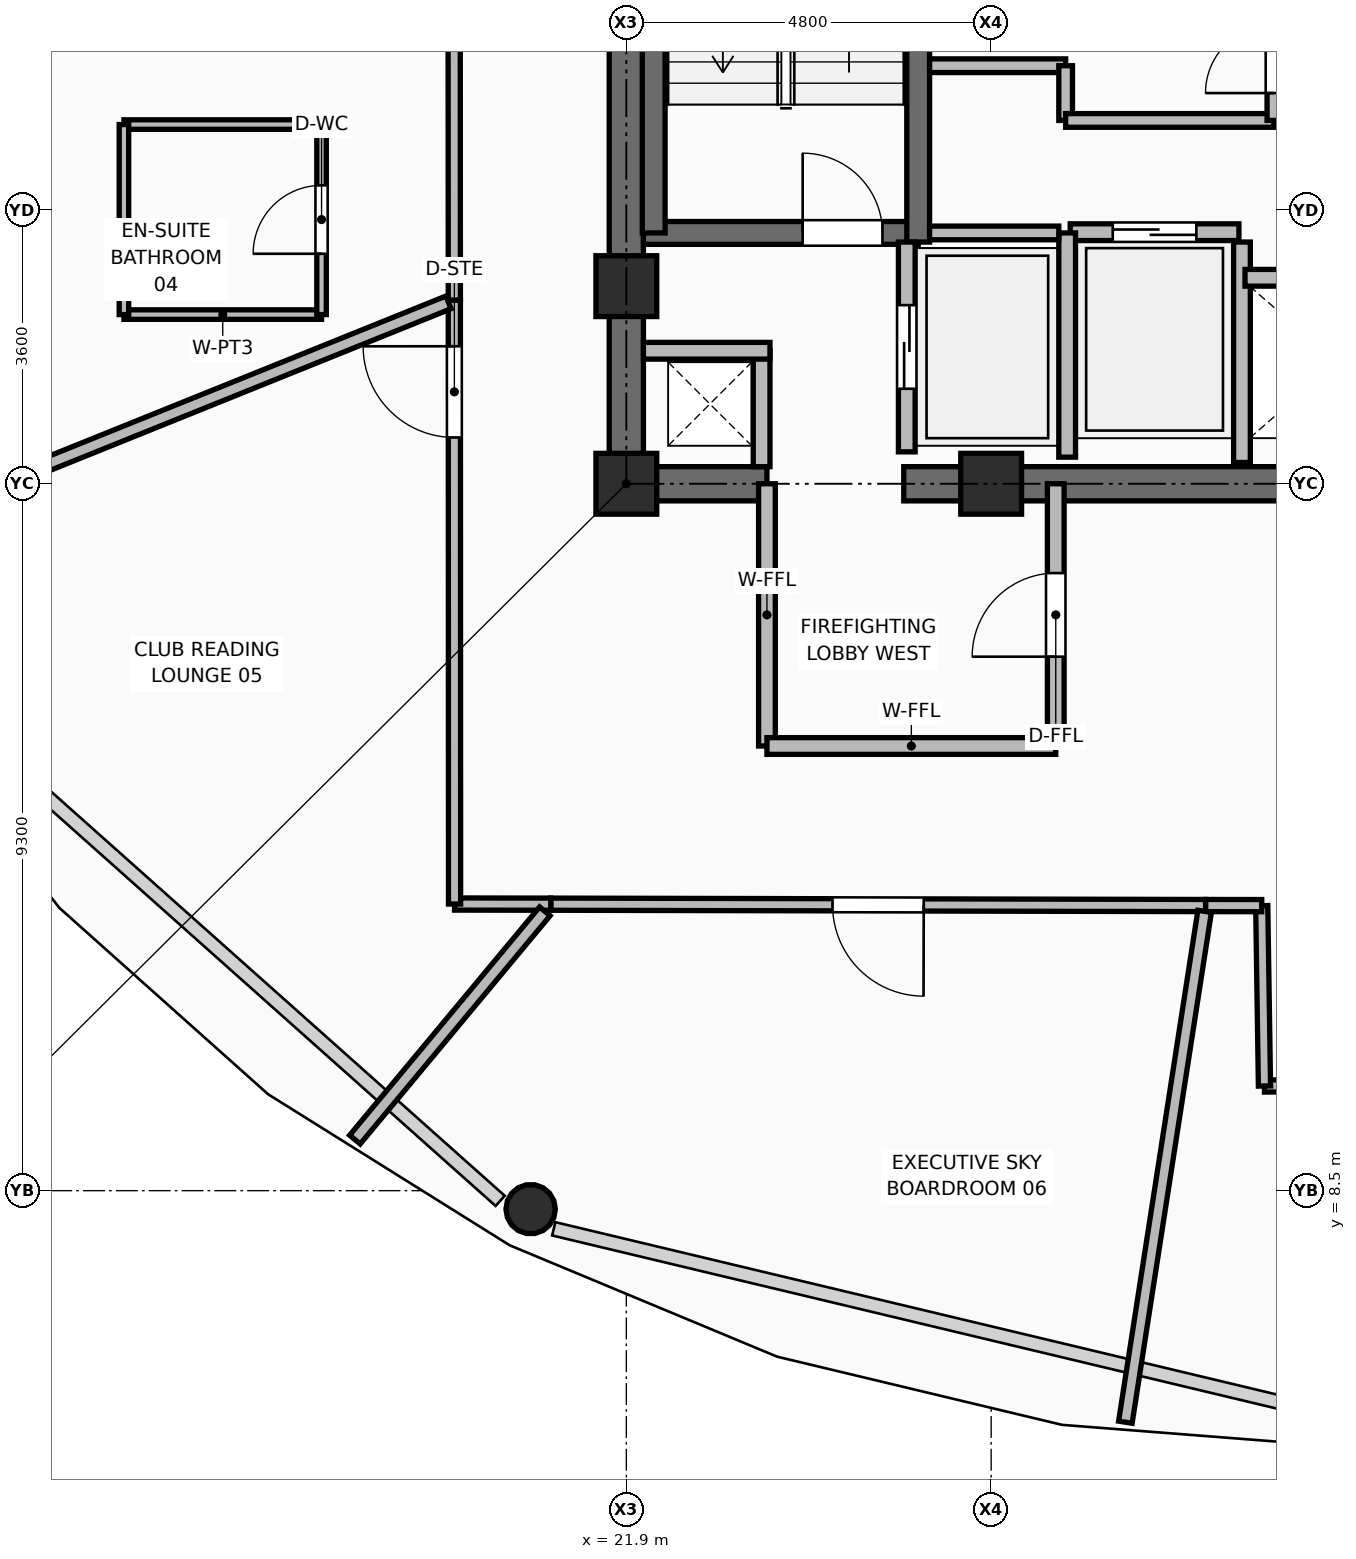
"""IFC4 building model, lengths in metres.
Left out: names, types, materials, properties, quantities, classifications, styles, units other than length and angle.
Written with IfcOpenShell. Run it as: python <this file> out.ifc"""

import sys

from ifc_helpers import new_model, si_unit, direction, frame, frame_2d, origin, origin_2d, place, context, subcontext, project, spatial, rectangle, hollow_circle, extrude, element, fill, save


model = new_model("IFC4")
c1 = context("Model", 3, precision=1e-05, world=origin(), true_north=direction((0.0, 1.0)))
c2 = subcontext(c1, "Body", "Model", "MODEL_VIEW")
j1 = project(units=[si_unit("LENGTHUNIT", "METRE"), si_unit("PLANEANGLEUNIT", "RADIAN")], contexts=[c1])
p1 = place(None, origin())
s1 = spatial("IfcSite", under=j1, at=p1, CompositionType="ELEMENT")
p2 = place(p1, origin())
s2 = spatial("IfcBuilding", under=s1, at=p2, CompositionType="ELEMENT")
p3 = place(p2, frame((0.0, 0.0, 246.15)))
s3 = spatial("IfcBuildingStorey", under=s2, at=p3, CompositionType="ELEMENT", Elevation=246.15)
for number, where, z_axis, x_axis in (
    (1, (21.9, 17.8, 0.0), (0.0, 0.0, 1.0), (1.0, 0.0, 0.0)),
    (2, (26.7, 17.8, 0.0), (0.0, 0.0, 1.0), (1.0, 0.0, 0.0)),
    (3, (21.9, 20.4, 0.0), (0.0, 0.0, 1.0), (1.0, 0.0, 0.0)),
):
    element("IfcColumn", number, at=place(p3, frame(where, z_axis=z_axis, x_axis=x_axis)), inside=s3, PredefinedType="COLUMN", context=c2, shape_type="SweptSolid", body=[
        extrude(rectangle(XDim=0.8, YDim=0.8, at=origin_2d()), origin(), (0.0, 0.0, 1.0), 3.75),
    ])
p4 = place(p3, frame((20.641, 8.257, 0.0), z_axis=(0.0, 0.0, 1.0), x_axis=(1.0, 0.0, 0.0)))
e4 = element("IfcColumn", 4, at=p4, inside=s3, PredefinedType="COLUMN", context=c2, shape_type="SweptSolid", body=[
    extrude(hollow_circle(Radius=0.325, WallThickness=0.03, at=origin_2d()), origin(), (0.0, 0.0, 1.0), 3.57),
])
p5 = place(p3, frame((30.0, 18.08, 0.0), z_axis=(0.0, 0.0, 1.0), x_axis=(0.0, 1.0, 0.0)))
e5 = element("IfcWall", 5, at=p5, inside=s3, PredefinedType="PARTITIONING", context=c2, shape_type="SweptSolid", body=[
    extrude(rectangle(XDim=2.9, YDim=0.22, at=frame_2d((1.45, 0.0))), origin(), (0.0, 0.0, 1.0), 3.545),
])
p6 = place(p3, frame((21.675, 17.8, 0.0), z_axis=(0.0, 0.0, 1.0), x_axis=(1.0, 0.0, 0.0)))
e6 = element("IfcWall", 6, at=p6, inside=s3, PredefinedType="SHEAR", context=c2, shape_type="SweptSolid", body=[
    extrude(rectangle(XDim=2.075, YDim=0.45, at=frame_2d((1.038, 0.0))), origin(), (0.0, 0.0, 1.0), 3.57),
])
p7 = place(p3, frame((25.55, 17.8, 0.0), z_axis=(0.0, 0.0, 1.0), x_axis=(1.0, 0.0, 0.0)))
e7 = element("IfcWall", 7, at=p7, inside=s3, PredefinedType="SHEAR", context=c2, shape_type="SweptSolid", body=[
    extrude(rectangle(XDim=6.9, YDim=0.45, at=frame_2d((3.45, 0.0))), origin(), (0.0, 0.0, 1.0), 3.57),
])
p8 = place(p3, frame((21.9, 18.025, 0.0), z_axis=(0.0, 0.0, 1.0), x_axis=(0.0, 1.0, 0.0)))
e8 = element("IfcWall", 8, at=p8, inside=s3, PredefinedType="SHEAR", context=c2, shape_type="SweptSolid", body=[
    extrude(rectangle(XDim=14.2, YDim=0.45, at=frame_2d((7.1, 0.0))), origin(), (0.0, 0.0, 1.0), 3.57),
])
p9 = place(p3, frame((22.125, 21.1, 0.0), z_axis=(0.0, 0.0, 1.0), x_axis=(1.0, 0.0, 0.0)))
e9 = element("IfcWall", 9, at=p9, inside=s3, PredefinedType="SHEAR", context=c2, shape_type="SweptSolid", body=[
    extrude(rectangle(XDim=3.615, YDim=0.3, at=frame_2d((1.808, 0.0))), origin(), (0.0, 0.0, 1.0), 3.57),
])
p10 = place(p9, frame((2.095, 0.0, 0.0)))
e10 = element("IfcOpeningElement", 10, at=p10, cuts=e9, PredefinedType="OPENING", context=c2, shape_type="SweptSolid", body=[
    extrude(rectangle(XDim=1.05, YDim=2.1, at=frame_2d((0.525, 1.05))), frame((0.0, 0.16, 0.0), z_axis=(0.0, -1.0, 0.0), x_axis=(1.0, 0.0, 0.0)), (0.0, 0.0, 1.0), 0.32),
])
p11 = place(p3, frame((25.74, 20.98, 0.0), z_axis=(0.0, 0.0, 1.0), x_axis=(0.0, 1.0, 0.0)))
e11 = element("IfcWall", 11, at=p11, inside=s3, PredefinedType="SHEAR", context=c2, shape_type="SweptSolid", body=[
    extrude(rectangle(XDim=7.99, YDim=0.3, at=frame_2d((3.995, 0.0))), origin(), (0.0, 0.0, 1.0), 3.57),
])
p12 = place(p3, frame((22.26, 21.1, 0.0), z_axis=(0.0, 0.0, 1.0), x_axis=(0.0, 1.0, 0.0)))
e12 = element("IfcWall", 12, at=p12, inside=s3, PredefinedType="SHEAR", context=c2, shape_type="SweptSolid", body=[
    extrude(rectangle(XDim=7.75, YDim=0.3, at=frame_2d((3.875, 0.0))), origin(), (0.0, 0.0, 1.0), 3.57),
])
p13 = place(p3, frame((23.68, 18.025, 0.0), z_axis=(0.0, 0.0, 1.0), x_axis=(0.0, 1.0, 0.0)))
e13 = element("IfcWall", 13, at=p13, inside=s3, PredefinedType="PARTITIONING", context=c2, shape_type="SweptSolid", body=[
    extrude(rectangle(XDim=1.525, YDim=0.22, at=frame_2d((0.763, 0.0))), origin(), (0.0, 0.0, 1.0), 3.55),
])
p14 = place(p3, frame((22.125, 19.55, 0.0), z_axis=(0.0, 0.0, 1.0), x_axis=(1.0, 0.0, 0.0)))
e14 = element("IfcWall", 14, at=p14, inside=s3, PredefinedType="PARTITIONING", context=c2, shape_type="SweptSolid", body=[
    extrude(rectangle(XDim=1.665, YDim=0.22, at=frame_2d((0.833, 0.0))), origin(), (0.0, 0.0, 1.0), 2.595),
])
p15 = place(p3, frame((25.59, 18.22, 0.0), z_axis=(0.0, 0.0, 1.0), x_axis=(0.0, 1.0, 0.0)))
e15 = element("IfcWall", 15, at=p15, inside=s3, PredefinedType="PARTITIONING", context=c2, shape_type="SweptSolid", body=[
    extrude(rectangle(XDim=2.76, YDim=0.22, at=frame_2d((1.38, 0.0))), origin(), (0.0, 0.0, 1.0), 3.55),
])
p16 = place(p15, frame((0.83, 0.0, 0.0)))
e16 = element("IfcOpeningElement", 16, at=p16, cuts=e15, PredefinedType="OPENING", context=c2, shape_type="SweptSolid", body=[
    extrude(rectangle(XDim=1.1, YDim=2.2, at=frame_2d((0.55, 1.1))), frame((0.0, 0.12, 0.0), z_axis=(0.0, -1.0, 0.0), x_axis=(1.0, 0.0, 0.0)), (0.0, 0.0, 1.0), 0.24),
])
p17 = place(p3, frame((27.74, 21.11, 0.0), z_axis=(0.0, 0.0, 1.0), x_axis=(1.0, 0.0, 0.0)))
e17 = element("IfcWall", 17, at=p17, inside=s3, PredefinedType="PARTITIONING", context=c2, shape_type="SweptSolid", body=[
    extrude(rectangle(XDim=2.22, YDim=0.22, at=frame_2d((1.11, 0.0))), origin(), (0.0, 0.0, 1.0), 3.55),
])
p18 = place(p17, frame((0.56, 0.0, 0.0)))
e18 = element("IfcOpeningElement", 18, at=p18, cuts=e17, PredefinedType="OPENING", context=c2, shape_type="SweptSolid", body=[
    extrude(rectangle(XDim=1.1, YDim=2.2, at=frame_2d((0.55, 1.1))), frame((0.0, 0.12, 0.0), z_axis=(0.0, -1.0, 0.0), x_axis=(1.0, 0.0, 0.0)), (0.0, 0.0, 1.0), 0.24),
])
p19 = place(p3, frame((30.04, 20.51, 0.0), z_axis=(0.0, 0.0, 1.0), x_axis=(1.0, 0.0, 0.0)))
e19 = element("IfcWall", 19, at=p19, inside=s3, PredefinedType="PARTITIONING", context=c2, shape_type="SweptSolid", body=[
    extrude(rectangle(XDim=2.42, YDim=0.22, at=frame_2d((1.21, 0.0))), origin(), (0.0, 0.0, 1.0), 3.55),
])
p20 = place(p3, frame((27.7, 18.15, 0.0), z_axis=(0.0, 0.0, 1.0), x_axis=(0.0, 1.0, 0.0)))
e20 = element("IfcWall", 20, at=p20, inside=s3, PredefinedType="PARTITIONING", context=c2, shape_type="SweptSolid", body=[
    extrude(rectangle(XDim=2.95, YDim=0.22, at=frame_2d((1.475, 0.0))), origin(), (0.0, 0.0, 1.0), 3.55),
])
p21 = place(p3, frame((25.89, 21.1, 0.0), z_axis=(0.0, 0.0, 1.0), x_axis=(1.0, 0.0, 0.0)))
e21 = element("IfcWall", 21, at=p21, inside=s3, PredefinedType="PARTITIONING", context=c2, shape_type="SweptSolid", body=[
    extrude(rectangle(XDim=1.7, YDim=0.18, at=frame_2d((0.85, 0.0))), origin(), (0.0, 0.0, 1.0), 3.55),
])
p22 = place(p3, frame((25.89, 23.3, 0.0), z_axis=(0.0, 0.0, 1.0), x_axis=(1.0, 0.0, 0.0)))
e22 = element("IfcWall", 22, at=p22, inside=s3, PredefinedType="PARTITIONING", context=c2, shape_type="SweptSolid", body=[
    extrude(rectangle(XDim=1.79, YDim=0.18, at=frame_2d((0.895, 0.0))), origin(), (0.0, 0.0, 1.0), 3.55),
])
p23 = place(p3, frame((27.68, 22.58, 0.0), z_axis=(0.0, 0.0, 1.0), x_axis=(0.0, 1.0, 0.0)))
e23 = element("IfcWall", 23, at=p23, inside=s3, PredefinedType="PARTITIONING", context=c2, shape_type="SweptSolid", body=[
    extrude(rectangle(XDim=0.72, YDim=0.18, at=frame_2d((0.36, 0.0))), origin(), (0.0, 0.0, 1.0), 3.55),
])
p24 = place(p3, frame((27.68, 22.58, 0.0), z_axis=(0.0, 0.0, 1.0), x_axis=(1.0, 0.0, 0.0)))
e24 = element("IfcWall", 24, at=p24, inside=s3, PredefinedType="PARTITIONING", context=c2, shape_type="SweptSolid", body=[
    extrude(rectangle(XDim=2.74, YDim=0.18, at=frame_2d((1.37, 0.0))), origin(), (0.0, 0.0, 1.0), 3.55),
])
p25 = place(p3, frame((30.42, 22.58, 0.0), z_axis=(0.0, 0.0, 1.0), x_axis=(0.0, 1.0, 0.0)))
e25 = element("IfcWall", 25, at=p25, inside=s3, PredefinedType="PARTITIONING", context=c2, shape_type="SweptSolid", body=[
    extrude(rectangle(XDim=1.62, YDim=0.18, at=frame_2d((0.81, 0.0))), origin(), (0.0, 0.0, 1.0), 3.55),
])
p26 = place(p25, frame((0.36, 0.0, 0.0)))
e26 = element("IfcOpeningElement", 26, at=p26, cuts=e25, PredefinedType="OPENING", context=c2, shape_type="SweptSolid", body=[
    extrude(rectangle(XDim=0.9, YDim=2.1, at=frame_2d((0.45, 1.05))), frame((0.0, 0.1, 0.0), z_axis=(0.0, -1.0, 0.0), x_axis=(1.0, 0.0, 0.0)), (0.0, 0.0, 1.0), 0.2),
])
p27 = place(p3, frame((23.75, 14.35, 0.0), z_axis=(0.0, 0.0, 1.0), x_axis=(0.0, 1.0, 0.0)))
e27 = element("IfcWall", 27, at=p27, inside=s3, PredefinedType="PARTITIONING", context=c2, shape_type="SweptSolid", body=[
    extrude(rectangle(XDim=3.45, YDim=0.22, at=frame_2d((1.725, 0.0))), origin(), (0.0, 0.0, 1.0), 3.081),
])
p28 = place(p3, frame((23.75, 14.35, 0.0), z_axis=(0.0, 0.0, 1.0), x_axis=(1.0, 0.0, 0.0)))
e28 = element("IfcWall", 28, at=p28, inside=s3, PredefinedType="PARTITIONING", context=c2, shape_type="SweptSolid", body=[
    extrude(rectangle(XDim=3.8, YDim=0.22, at=frame_2d((1.9, 0.0))), origin(), (0.0, 0.0, 1.0), 3.55),
])
p29 = place(p3, frame((27.55, 14.35, 0.0), z_axis=(0.0, 0.0, 1.0), x_axis=(0.0, 1.0, 0.0)))
e29 = element("IfcWall", 29, at=p29, inside=s3, PredefinedType="PARTITIONING", context=c2, shape_type="SweptSolid", body=[
    extrude(rectangle(XDim=3.45, YDim=0.22, at=frame_2d((1.725, 0.0))), origin(), (0.0, 0.0, 1.0), 3.081),
])
p30 = place(p29, frame((1.175, 0.0, 0.0)))
e30 = element("IfcOpeningElement", 30, at=p30, cuts=e29, PredefinedType="OPENING", context=c2, shape_type="SweptSolid", body=[
    extrude(rectangle(XDim=1.1, YDim=2.1, at=frame_2d((0.55, 1.05))), frame((0.0, 0.12, 0.0), z_axis=(0.0, -1.0, 0.0), x_axis=(1.0, 0.0, 0.0)), (0.0, 0.0, 1.0), 0.24),
])
p31 = place(p3, frame((32.728, 9.889, 0.0), z_axis=(0.0, 0.0, 1.0), x_axis=(-0.999987903459, -0.004918631527, 0.0)))
e31 = element("IfcWall", 31, at=p31, inside=s3, PredefinedType="PARTITIONING", context=c2, shape_type="SweptSolid", body=[
    extrude(rectangle(XDim=2.432, YDim=0.16, at=frame_2d((1.216, 0.0))), origin(), (0.0, 0.0, 1.0), 3.081),
])
p32 = place(p3, frame((30.296, 9.877, 0.0), z_axis=(0.0, 0.0, 1.0), x_axis=(-0.015121727576, 0.999885660141, 0.0)))
e32 = element("IfcWall", 32, at=p32, inside=s3, PredefinedType="PARTITIONING", context=c2, shape_type="SweptSolid", body=[
    extrude(rectangle(XDim=2.373, YDim=0.16, at=frame_2d((1.187, 0.0))), origin(), (0.0, 0.0, 1.0), 3.55),
])
p33 = place(p3, frame((30.26, 12.25, 0.0), z_axis=(0.0, 0.0, 1.0), x_axis=(-0.999999126899, 0.001321439216, 0.0)))
e33 = element("IfcWall", 33, at=p33, inside=s3, PredefinedType="PARTITIONING", context=c2, shape_type="SweptSolid", body=[
    extrude(rectangle(XDim=0.739, YDim=0.16, at=frame_2d((0.37, 0.0))), origin(), (0.0, 0.0, 1.0), 3.55),
])
p34 = place(p3, frame((29.521, 12.251, 0.0), z_axis=(0.0, 0.0, 1.0), x_axis=(-0.999997801115, 0.002097084968, 0.0)))
e34 = element("IfcWall", 34, at=p34, inside=s3, PredefinedType="PARTITIONING", context=c2, shape_type="SweptSolid", body=[
    extrude(rectangle(XDim=8.615, YDim=0.16, at=frame_2d((4.308, 0.0))), origin(), (0.0, 0.0, 1.0), 3.081),
])
p35 = place(p34, frame((3.708, 0.0, 0.0)))
e35 = element("IfcOpeningElement", 35, at=p35, cuts=e34, PredefinedType="OPENING", context=c2, shape_type="SweptSolid", body=[
    extrude(rectangle(XDim=1.2, YDim=2.1, at=frame_2d((0.6, 1.05))), frame((0.0, 0.09, 0.0), z_axis=(0.0, -1.0, 0.0), x_axis=(1.0, 0.0, 0.0)), (0.0, 0.0, 1.0), 0.18),
])
p36 = place(p3, frame((20.906, 12.269, 0.0), z_axis=(0.0, 0.0, 1.0), x_axis=(-0.999998810172, 0.001542612897, 0.0)))
e36 = element("IfcWall", 36, at=p36, inside=s3, PredefinedType="PARTITIONING", context=c2, shape_type="SweptSolid", body=[
    extrude(rectangle(XDim=1.266, YDim=0.16, at=frame_2d((0.633, 0.0))), origin(), (0.0, 0.0, 1.0), 3.55),
])
p37 = place(p3, frame((19.64, 12.271, 0.0), z_axis=(0.0, 0.0, 1.0), x_axis=(-0.000368697551, 0.999999932031, 0.0)))
e37 = element("IfcWall", 37, at=p37, inside=s3, PredefinedType="PARTITIONING", context=c2, shape_type="SweptSolid", body=[
    extrude(rectangle(XDim=7.946, YDim=0.16, at=frame_2d((3.973, 0.0))), origin(), (0.0, 0.0, 1.0), 3.081),
])
p38 = place(p37, frame((6.138, 0.0, 0.0)))
e38 = element("IfcOpeningElement", 38, at=p38, cuts=e37, PredefinedType="OPENING", context=c2, shape_type="SweptSolid", body=[
    extrude(rectangle(XDim=1.2, YDim=2.1, at=frame_2d((0.6, 1.05))), frame((0.0, 0.09, 0.0), z_axis=(0.0, -1.0, 0.0), x_axis=(1.0, 0.0, 0.0)), (0.0, 0.0, 1.0), 0.18),
])
p39 = place(p3, frame((19.637, 20.217, 0.0), z_axis=(0.0, 0.0, 1.0), x_axis=(-0.000537020799, 0.999999855804, 0.0)))
e39 = element("IfcWall", 39, at=p39, inside=s3, PredefinedType="PARTITIONING", context=c2, shape_type="SweptSolid", body=[
    extrude(rectangle(XDim=3.637, YDim=0.16, at=frame_2d((1.818, 0.0))), origin(), (0.0, 0.0, 1.0), 3.081),
])
p40 = place(p3, frame((19.56, 20.186, 0.0), z_axis=(0.0, 0.0, 1.0), x_axis=(-0.927433425778, -0.37398828959, 0.0)))
e40 = element("IfcWall", 40, at=p40, inside=s3, PredefinedType="PARTITIONING", context=c2, shape_type="SweptSolid", body=[
    extrude(rectangle(XDim=8.827, YDim=0.18, at=frame_2d((4.413, 0.0))), origin(), (0.0, 0.0, 1.0), 2.925),
])
p41 = place(p3, frame((20.828, 12.175, 0.0), z_axis=(0.0, 0.0, 1.0), x_axis=(-0.639631003839, -0.768682105248, 0.0)))
e41 = element("IfcWall", 41, at=p41, inside=s3, PredefinedType="PARTITIONING", context=c2, shape_type="SweptSolid", body=[
    extrude(rectangle(XDim=3.906, YDim=0.18, at=frame_2d((1.953, 0.0))), origin(), (0.0, 0.0, 1.0), 2.925),
])
p42 = place(p3, frame((29.509, 12.175, 0.0), z_axis=(0.0, 0.0, 1.0), x_axis=(-0.15334639492, -0.988172496665, 0.0)))
e42 = element("IfcWall", 42, at=p42, inside=s3, PredefinedType="PARTITIONING", context=c2, shape_type="SweptSolid", body=[
    extrude(rectangle(XDim=6.801, YDim=0.18, at=frame_2d((3.401, 0.0))), origin(), (0.0, 0.0, 1.0), 2.925),
])
p43 = place(p3, frame((15.29, 20.026, 0.0), z_axis=(0.0, 0.0, 1.0), x_axis=(1.0, 0.0, 0.0)))
e43 = element("IfcWall", 43, at=p43, inside=s3, PredefinedType="PARTITIONING", context=c2, shape_type="SweptSolid", body=[
    extrude(rectangle(XDim=2.6, YDim=0.125, at=frame_2d((1.3, 0.0))), origin(), (0.0, 0.0, 1.0), 3.55),
])
p44 = place(p3, frame((15.29, 22.526, 0.0), z_axis=(0.0, 0.0, 1.0), x_axis=(1.0, 0.0, 0.0)))
e44 = element("IfcWall", 44, at=p44, inside=s3, PredefinedType="PARTITIONING", context=c2, shape_type="SweptSolid", body=[
    extrude(rectangle(XDim=2.6, YDim=0.125, at=frame_2d((1.3, 0.0))), origin(), (0.0, 0.0, 1.0), 3.081),
])
p45 = place(p3, frame((15.29, 20.026, 0.0), z_axis=(0.0, 0.0, 1.0), x_axis=(0.0, 1.0, 0.0)))
e45 = element("IfcWall", 45, at=p45, inside=s3, PredefinedType="PARTITIONING", context=c2, shape_type="SweptSolid", body=[
    extrude(rectangle(XDim=2.5, YDim=0.125, at=frame_2d((1.25, 0.0))), origin(), (0.0, 0.0, 1.0), 3.55),
])
p46 = place(p3, frame((17.89, 20.026, 0.0), z_axis=(0.0, 0.0, 1.0), x_axis=(0.0, 1.0, 0.0)))
e46 = element("IfcWall", 46, at=p46, inside=s3, PredefinedType="PARTITIONING", context=c2, shape_type="SweptSolid", body=[
    extrude(rectangle(XDim=2.5, YDim=0.125, at=frame_2d((1.25, 0.0))), origin(), (0.0, 0.0, 1.0), 3.081),
])
p47 = place(p46, frame((0.8, 0.0, 0.0)))
e47 = element("IfcOpeningElement", 47, at=p47, cuts=e46, PredefinedType="OPENING", context=c2, shape_type="SweptSolid", body=[
    extrude(rectangle(XDim=0.9, YDim=2.1, at=frame_2d((0.45, 1.05))), frame((0.0, 0.073, 0.0), z_axis=(0.0, -1.0, 0.0), x_axis=(1.0, 0.0, 0.0)), (0.0, 0.0, 1.0), 0.145),
])
p48 = place(p10, origin())
e48 = element("IfcDoor", 48, at=p48, inside=s3, OperationType="SINGLE_SWING_LEFT", PredefinedType="DOOR", context=c2, shape_type="SweptSolid", body=[
    extrude(rectangle(XDim=1.05, YDim=2.1, at=frame_2d((0.525, 1.05))), frame((0.0, 0.025, 0.0), z_axis=(0.0, -1.0, 0.0), x_axis=(1.0, 0.0, 0.0)), (0.0, 0.0, 1.0), 0.05),
])
fill(e10, e48)
p49 = place(p16, origin())
e49 = element("IfcDoor", 49, at=p49, inside=s3, OperationType="DOUBLE_DOOR_SLIDING", PredefinedType="DOOR", context=c2, shape_type="SweptSolid", body=[
    extrude(rectangle(XDim=1.1, YDim=2.2, at=frame_2d((0.55, 1.1))), frame((0.0, 0.025, 0.0), z_axis=(0.0, -1.0, 0.0), x_axis=(1.0, 0.0, 0.0)), (0.0, 0.0, 1.0), 0.05),
])
fill(e16, e49)
p50 = place(p18, origin())
e50 = element("IfcDoor", 50, at=p50, inside=s3, OperationType="DOUBLE_DOOR_SLIDING", PredefinedType="DOOR", context=c2, shape_type="SweptSolid", body=[
    extrude(rectangle(XDim=1.1, YDim=2.2, at=frame_2d((0.55, 1.1))), frame((0.0, 0.025, 0.0), z_axis=(0.0, -1.0, 0.0), x_axis=(1.0, 0.0, 0.0)), (0.0, 0.0, 1.0), 0.05),
])
fill(e18, e50)
p51 = place(p26, origin())
e51 = element("IfcDoor", 51, at=p51, inside=s3, OperationType="SINGLE_SWING_LEFT", PredefinedType="DOOR", context=c2, shape_type="SweptSolid", body=[
    extrude(rectangle(XDim=0.9, YDim=2.1, at=frame_2d((0.45, 1.05))), frame((0.0, 0.025, 0.0), z_axis=(0.0, -1.0, 0.0), x_axis=(1.0, 0.0, 0.0)), (0.0, 0.0, 1.0), 0.05),
])
fill(e26, e51)
p52 = place(p30, origin())
e52 = element("IfcDoor", 52, at=p52, inside=s3, OperationType="SINGLE_SWING_LEFT", PredefinedType="DOOR", context=c2, shape_type="SweptSolid", body=[
    extrude(rectangle(XDim=1.1, YDim=2.1, at=frame_2d((0.55, 1.05))), frame((0.0, 0.025, 0.0), z_axis=(0.0, -1.0, 0.0), x_axis=(1.0, 0.0, 0.0)), (0.0, 0.0, 1.0), 0.05),
])
fill(e30, e52)
p53 = place(p47, origin())
e53 = element("IfcDoor", 53, at=p53, inside=s3, OperationType="SINGLE_SWING_LEFT", PredefinedType="DOOR", context=c2, shape_type="SweptSolid", body=[
    extrude(rectangle(XDim=0.9, YDim=2.1, at=frame_2d((0.45, 1.05))), frame((0.0, 0.025, 0.0), z_axis=(0.0, -1.0, 0.0), x_axis=(1.0, 0.0, 0.0)), (0.0, 0.0, 1.0), 0.05),
])
fill(e47, e53)
p54 = place(p38, origin())
e54 = element("IfcDoor", 54, at=p54, inside=s3, OperationType="SINGLE_SWING_RIGHT", PredefinedType="DOOR", context=c2, shape_type="SweptSolid", body=[
    extrude(rectangle(XDim=1.2, YDim=2.1, at=frame_2d((0.6, 1.05))), frame((0.0, 0.025, 0.0), z_axis=(0.0, -1.0, 0.0), x_axis=(1.0, 0.0, 0.0)), (0.0, 0.0, 1.0), 0.05),
])
fill(e38, e54)
p55 = place(p35, origin())
e55 = element("IfcDoor", 55, at=p55, inside=s3, OperationType="SINGLE_SWING_LEFT", PredefinedType="DOOR", context=c2, shape_type="SweptSolid", body=[
    extrude(rectangle(XDim=1.2, YDim=2.1, at=frame_2d((0.6, 1.05))), frame((0.0, 0.025, 0.0), z_axis=(0.0, -1.0, 0.0), x_axis=(1.0, 0.0, 0.0)), (0.0, 0.0, 1.0), 0.05),
])
fill(e35, e55)
save(model, sys.argv[1])
